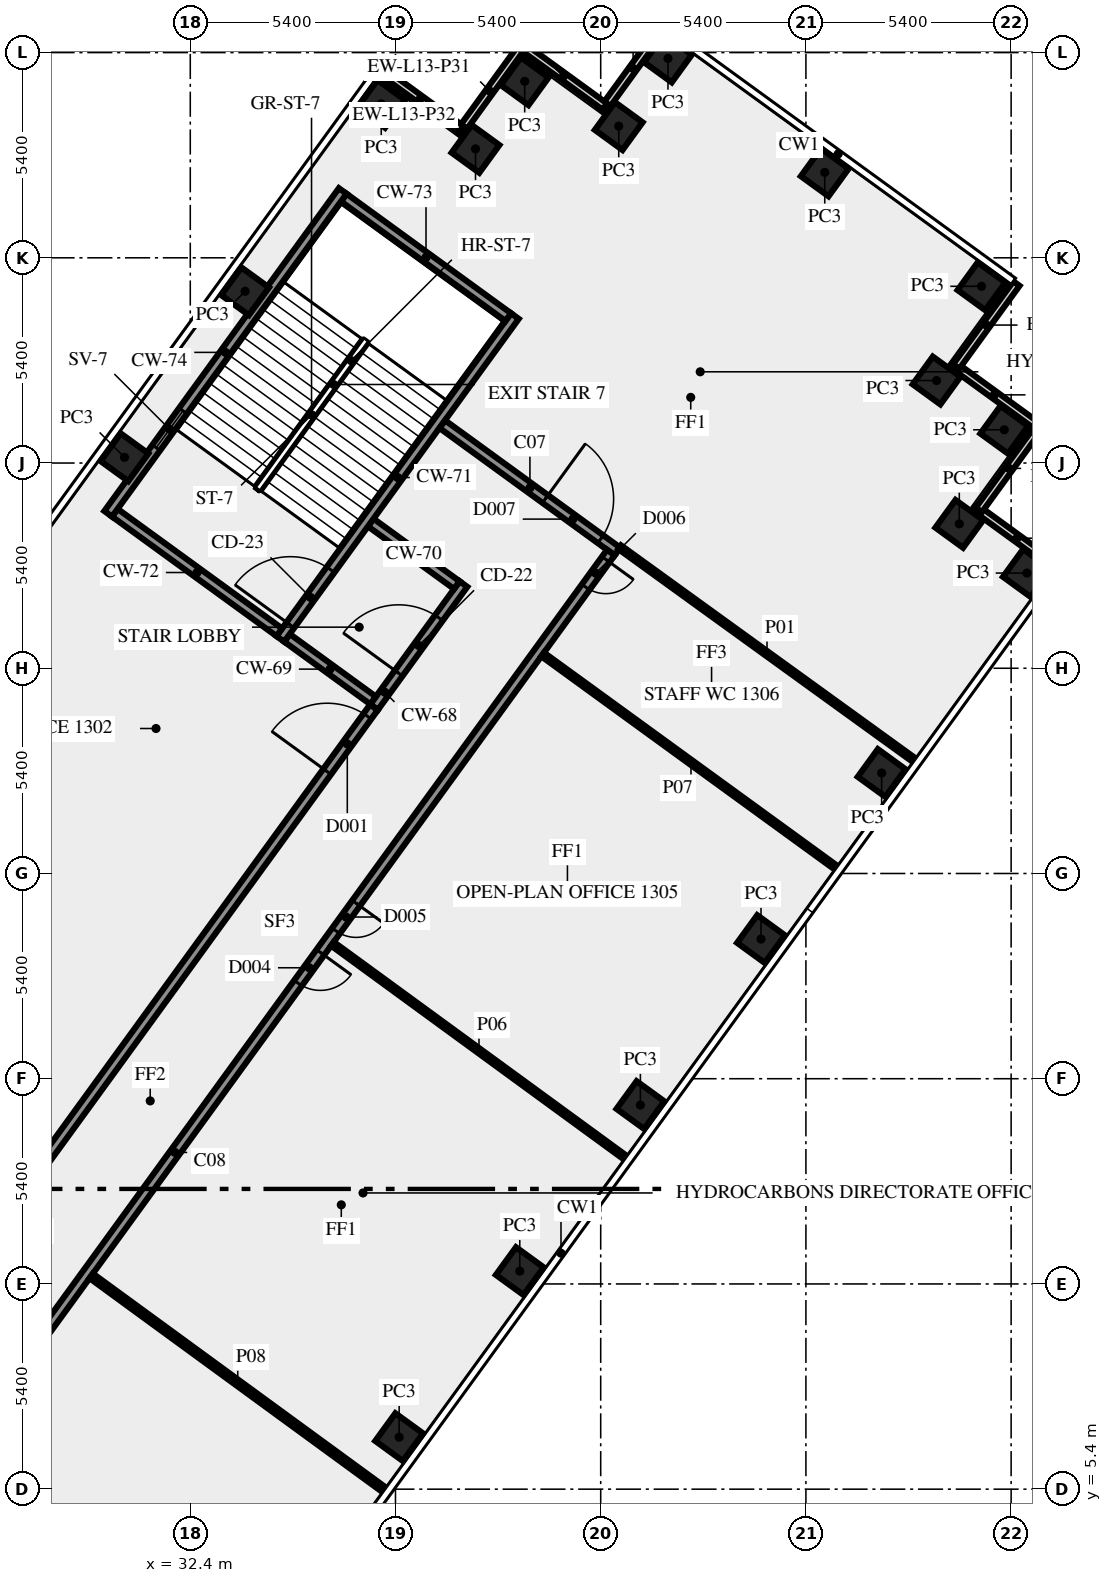
"""IFC4 building model, lengths in metres.
Left out: names, types, materials, properties, quantities, classifications, styles, units other than length and angle.
Written with IfcOpenShell. Run it as: python <this file> out.ifc"""

import sys

from ifc_helpers import new_model, si_unit, direction, frame, frame_2d, origin, origin_2d, place, context, subcontext, project, spatial, rectangle, extrude, element, fill, save


model = new_model("IFC4")
c1 = context("Model", 3, precision=1e-05, world=origin(), true_north=direction((0.0, 1.0)))
c2 = subcontext(c1, "Body", "Model", "MODEL_VIEW")
j1 = project(units=[si_unit("LENGTHUNIT", "METRE"), si_unit("PLANEANGLEUNIT", "RADIAN")], contexts=[c1])
p1 = place(None, origin())
s1 = spatial("IfcSite", under=j1, at=p1, CompositionType="ELEMENT")
p2 = place(p1, origin())
s2 = spatial("IfcBuilding", under=s1, at=p2, CompositionType="ELEMENT")
p3 = place(p2, frame((0.0, 0.0, 59.0)))
s3 = spatial("IfcBuildingStorey", under=s2, at=p3, CompositionType="ELEMENT", Elevation=59.0)
for number, where, z_axis, x_axis in (
    (1, (37.896, 6.769, 0.0), (0.0, 0.0, 1.0), (0.588, 0.809, 0.0)),
    (2, (41.07, 11.137, 0.0), (0.0, 0.0, 1.0), (0.588, 0.809, 0.0)),
    (3, (44.244, 15.506, 0.0), (0.0, 0.0, 1.0), (0.588, 0.809, 0.0)),
    (4, (47.418, 19.875, 0.0), (0.0, 0.0, 1.0), (0.588, 0.809, 0.0)),
    (5, (50.592, 24.243, 0.0), (0.0, 0.0, 1.0), (0.588, 0.809, 0.0)),
    (6, (54.415, 29.505, 0.0), (0.0, 0.0, 1.0), (0.588, 0.809, 0.0)),
    (7, (52.636, 30.8, 0.0), (0.0, 0.0, 1.0), (-0.809, 0.588, 0.0)),
    (8, (53.82, 33.275, 0.0), (0.0, 0.0, 1.0), (-0.809, 0.588, 0.0)),
    (9, (52.039, 34.571, 0.0), (0.0, 0.0, 1.0), (0.588, 0.809, 0.0)),
    (10, (53.22, 37.05, 0.0), (0.0, 0.0, 1.0), (-0.809, 0.588, 0.0)),
    (11, (49.096, 40.047, 0.0), (0.0, 0.0, 1.0), (-0.809, 0.588, 0.0)),
    (12, (44.97, 43.045, 0.0), (0.0, 0.0, 1.0), (-0.809, 0.588, 0.0)),
    (13, (43.675, 41.265, 0.0), (0.0, 0.0, 1.0), (-0.809, 0.588, 0.0)),
    (14, (41.2, 42.445, 0.0), (0.0, 0.0, 1.0), (-0.588, -0.809, 0.0)),
    (15, (39.906, 40.666, 0.0), (0.0, 0.0, 1.0), (-0.588, -0.809, 0.0)),
    (16, (37.425, 41.85, 0.0), (0.0, 0.0, 1.0), (-0.588, -0.809, 0.0)),
    (17, (33.843, 36.919, 0.0), (0.0, 0.0, 1.0), (-0.588, -0.809, 0.0)),
    (18, (30.669, 32.55, 0.0), (0.0, 0.0, 1.0), (-0.588, -0.809, 0.0)),
):
    element("IfcColumn", number, at=place(p3, frame(where, z_axis=z_axis, x_axis=x_axis)), inside=s3, PredefinedType="COLUMN", context=c2, shape_type="SweptSolid", body=[
        extrude(rectangle(XDim=0.9, YDim=0.9, at=origin_2d()), origin(), (0.0, 0.0, 1.0), 3.65),
    ])
p4 = place(p3, frame((55.247, 29.629, 0.0), z_axis=(0.0, 0.0, 1.0), x_axis=(-0.809033161865, 0.587762999008, 0.0)))
e19 = element("IfcWall", 19, at=p4, inside=s3, PredefinedType="SOLIDWALL", context=c2, shape_type="SweptSolid", body=[
    extrude(rectangle(XDim=2.7, YDim=0.2, at=frame_2d((1.35, 0.0))), origin(), (0.0, 0.0, 1.0), 3.65),
])
p5 = place(p3, frame((53.151, 31.167, 0.0), z_axis=(0.0, 0.0, 1.0), x_axis=(0.587779184282, 0.809021403008, 0.0)))
e20 = element("IfcWall", 20, at=p5, inside=s3, PredefinedType="SOLIDWALL", context=c2, shape_type="SweptSolid", body=[
    extrude(rectangle(XDim=2.7, YDim=0.2, at=frame_2d((1.35, 0.0))), origin(), (0.0, 0.0, 1.0), 3.65),
])
for number, where, z_axis, x_axis in (
    (21, (54.65, 33.4, 0.0), (0.0, 0.0, 1.0), (-0.809, 0.588, 0.0)),
    (22, (52.553, 34.938, 0.0), (0.0, 0.0, 1.0), (0.588, 0.809, 0.0)),
    (23, (44.846, 43.875, 0.0), (0.0, 0.0, 1.0), (-0.588, -0.809, 0.0)),
    (24, (43.308, 41.779, 0.0), (0.0, 0.0, 1.0), (-0.809, 0.588, 0.0)),
):
    element("IfcWall", number, at=place(p3, frame(where, z_axis=z_axis, x_axis=x_axis)), inside=s3, PredefinedType="SOLIDWALL", context=c2, shape_type="SweptSolid", body=[
        extrude(rectangle(XDim=2.7, YDim=0.2, at=frame_2d((1.35, 0.0))), origin(), (0.0, 0.0, 1.0), 3.65),
    ])
p6 = place(p3, frame((41.075, 43.278, 0.0), z_axis=(0.0, 0.0, 1.0), x_axis=(-0.587806000234, -0.809001919707, 0.0)))
e25 = element("IfcWall", 25, at=p6, inside=s3, PredefinedType="SOLIDWALL", context=c2, shape_type="SweptSolid", body=[
    extrude(rectangle(XDim=2.7, YDim=0.2, at=frame_2d((1.35, 0.0))), origin(), (0.0, 0.0, 1.0), 3.65),
])
p7 = place(p3, frame((39.537, 41.181, 0.0), z_axis=(0.0, 0.0, 1.0), x_axis=(-0.809033161865, 0.587762999008, 0.0)))
e26 = element("IfcWall", 26, at=p7, inside=s3, PredefinedType="SOLIDWALL", context=c2, shape_type="SweptSolid", body=[
    extrude(rectangle(XDim=2.7, YDim=0.2, at=frame_2d((1.35, 0.0))), origin(), (0.0, 0.0, 1.0), 3.65),
])
p8 = place(p3, frame((37.238, 25.98, 0.0), z_axis=(0.0, 0.0, 1.0), x_axis=(0.587772420479, 0.809026317077, 0.0)))
e27 = element("IfcWall", 27, at=p8, inside=s3, PredefinedType="SHEAR", context=c2, shape_type="SweptSolid", body=[
    extrude(rectangle(XDim=4.0, YDim=0.25, at=frame_2d((2.0, 0.0))), origin(), (0.0, 0.0, 1.0), 3.65),
])
p9 = place(p8, frame((1.1, 0.0, 0.0)))
e28 = element("IfcOpeningElement", 28, at=p9, cuts=e27, PredefinedType="OPENING", context=c2, shape_type="SweptSolid", body=[
    extrude(rectangle(XDim=1.8, YDim=2.1, at=frame_2d((0.9, 1.05))), frame((0.0, 0.135, 0.0), z_axis=(0.0, -1.0, 0.0), x_axis=(1.0, 0.0, 0.0)), (0.0, 0.0, 1.0), 0.27),
])
for number, where, z_axis, x_axis in (
    (29, (37.21, 26.154, 0.0), (0.0, 0.0, 1.0), (-0.809, 0.588, 0.0)),
    (30, (39.414, 29.188, 0.0), (0.0, 0.0, 1.0), (-0.809, 0.588, 0.0)),
):
    element("IfcWall", number, at=place(p3, frame(where, z_axis=z_axis, x_axis=x_axis)), inside=s3, PredefinedType="SHEAR", context=c2, shape_type="SweptSolid", body=[
        extrude(rectangle(XDim=2.8, YDim=0.25, at=frame_2d((1.4, 0.0))), origin(), (0.0, 0.0, 1.0), 3.65),
    ])
p10 = place(p3, frame((34.77, 27.772, 0.0), z_axis=(0.0, 0.0, 1.0), x_axis=(0.587795589702, 0.809009483706, 0.0)))
e31 = element("IfcWall", 31, at=p10, inside=s3, PredefinedType="SHEAR", context=c2, shape_type="SweptSolid", body=[
    extrude(rectangle(XDim=10.5, YDim=0.25, at=frame_2d((5.25, 0.0))), origin(), (0.0, 0.0, 1.0), 3.65),
])
p11 = place(p10, frame((0.45, 0.0, 0.0)))
e32 = element("IfcOpeningElement", 32, at=p11, cuts=e31, PredefinedType="OPENING", context=c2, shape_type="SweptSolid", body=[
    extrude(rectangle(XDim=1.8, YDim=2.1, at=frame_2d((0.9, 1.05))), frame((0.0, 0.135, 0.0), z_axis=(0.0, -1.0, 0.0), x_axis=(1.0, 0.0, 0.0)), (0.0, 0.0, 1.0), 0.27),
])
p12 = place(p3, frame((34.742, 27.947, 0.0), z_axis=(0.0, 0.0, 1.0), x_axis=(-0.8089984606, 0.587810760999, 0.0)))
e33 = element("IfcWall", 33, at=p12, inside=s3, PredefinedType="SHEAR", context=c2, shape_type="SweptSolid", body=[
    extrude(rectangle(XDim=5.35, YDim=0.25, at=frame_2d((2.675, 0.0))), origin(), (0.0, 0.0, 1.0), 3.65),
])
p13 = place(p3, frame((40.767, 36.24, 0.0), z_axis=(0.0, 0.0, 1.0), x_axis=(-0.809020161303, 0.587780893365, 0.0)))
e34 = element("IfcWall", 34, at=p13, inside=s3, PredefinedType="SHEAR", context=c2, shape_type="SweptSolid", body=[
    extrude(rectangle(XDim=5.35, YDim=0.25, at=frame_2d((2.675, 0.0))), origin(), (0.0, 0.0, 1.0), 3.65),
])
p14 = place(p3, frame((30.24, 31.064, 0.0), z_axis=(0.0, 0.0, 1.0), x_axis=(0.587795589702, 0.809009483706, 0.0)))
e35 = element("IfcWall", 35, at=p14, inside=s3, PredefinedType="SHEAR", context=c2, shape_type="SweptSolid", body=[
    extrude(rectangle(XDim=10.5, YDim=0.25, at=frame_2d((5.25, 0.0))), origin(), (0.0, 0.0, 1.0), 3.65),
])
p15 = place(p14, frame((2.15, 0.0, 1.0)))
e36 = element("IfcOpeningElement", 36, at=p15, cuts=e35, PredefinedType="OPENING", context=c2, shape_type="SweptSolid", body=[
    extrude(rectangle(XDim=1.2, YDim=1.2, at=frame_2d((0.6, 0.6))), frame((0.0, 0.135, 0.0), z_axis=(0.0, -1.0, 0.0), x_axis=(1.0, 0.0, 0.0)), (0.0, 0.0, 1.0), 0.27),
])
p16 = place(p3, frame((17.545, -1.125, 0.0), z_axis=(0.0, 0.0, 1.0), x_axis=(0.587786323093, 0.809016216391, 0.0)))
e37 = element("IfcWall", 37, at=p16, inside=s3, PredefinedType="SOLIDWALL", context=c2, shape_type="SweptSolid", body=[
    extrude(rectangle(XDim=33.493, YDim=0.25, at=frame_2d((16.747, 0.0))), origin(), (0.0, 0.0, 1.0), 3.65),
])
p17 = place(p16, frame((31.403, 0.0, 0.0)))
e38 = element("IfcOpeningElement", 38, at=p17, cuts=e37, PredefinedType="OPENING", context=c2, shape_type="SweptSolid", body=[
    extrude(rectangle(XDim=1.8, YDim=2.1, at=frame_2d((0.9, 1.05))), frame((0.0, 0.135, 0.0), z_axis=(0.0, -1.0, 0.0), x_axis=(1.0, 0.0, 0.0)), (0.0, 0.0, 1.0), 0.27),
])
p18 = place(p16, frame((3.392, 0.0, 0.0)))
e39 = element("IfcOpeningElement", 39, at=p18, cuts=e37, PredefinedType="OPENING", context=c2, shape_type="SweptSolid", body=[
    extrude(rectangle(XDim=1.8, YDim=2.1, at=frame_2d((0.9, 1.05))), frame((0.0, 0.135, 0.0), z_axis=(0.0, -1.0, 0.0), x_axis=(1.0, 0.0, 0.0)), (0.0, 0.0, 1.0), 0.27),
])
p19 = place(p3, frame((39.034, 33.42, 0.0), z_axis=(0.0, 0.0, 1.0), x_axis=(0.809023325802, -0.587776537732, 0.0)))
e40 = element("IfcWall", 40, at=p19, inside=s3, PredefinedType="SOLIDWALL", context=c2, shape_type="SweptSolid", body=[
    extrude(rectangle(XDim=5.695, YDim=0.25, at=frame_2d((2.848, 0.0))), origin(), (0.0, 0.0, 1.0), 3.65),
])
p20 = place(p19, frame((3.345, 0.0, 0.0)))
e41 = element("IfcOpeningElement", 41, at=p20, cuts=e40, PredefinedType="OPENING", context=c2, shape_type="SweptSolid", body=[
    extrude(rectangle(XDim=1.8, YDim=2.1, at=frame_2d((0.9, 1.05))), frame((0.0, 0.135, 0.0), z_axis=(0.0, -1.0, 0.0), x_axis=(1.0, 0.0, 0.0)), (0.0, 0.0, 1.0), 0.27),
])
p21 = place(p3, frame((43.467, 30.045, 0.0), z_axis=(0.0, 0.0, 1.0), x_axis=(-0.587784726077, -0.809017376692, 0.0)))
e42 = element("IfcWall", 42, at=p21, inside=s3, PredefinedType="SOLIDWALL", context=c2, shape_type="SweptSolid", body=[
    extrude(rectangle(XDim=39.02, YDim=0.25, at=frame_2d((19.51, 0.0))), origin(), (0.0, 0.0, 1.0), 3.65),
])
p22 = place(p21, frame((11.404, 0.0, 0.0)))
e43 = element("IfcOpeningElement", 43, at=p22, cuts=e42, PredefinedType="OPENING", context=c2, shape_type="SweptSolid", body=[
    extrude(rectangle(XDim=0.9, YDim=2.1, at=frame_2d((0.45, 1.05))), frame((0.0, 0.135, 0.0), z_axis=(0.0, -1.0, 0.0), x_axis=(1.0, 0.0, 0.0)), (0.0, 0.0, 1.0), 0.27),
])
p23 = place(p21, frame((13.004, 0.0, 0.0)))
e44 = element("IfcOpeningElement", 44, at=p23, cuts=e42, PredefinedType="OPENING", context=c2, shape_type="SweptSolid", body=[
    extrude(rectangle(XDim=1.0, YDim=2.1, at=frame_2d((0.5, 1.05))), frame((0.0, 0.135, 0.0), z_axis=(0.0, -1.0, 0.0), x_axis=(1.0, 0.0, 0.0)), (0.0, 0.0, 1.0), 0.27),
])
p24 = place(p21, frame((37.287, 0.0, 0.0)))
e45 = element("IfcOpeningElement", 45, at=p24, cuts=e42, PredefinedType="OPENING", context=c2, shape_type="SweptSolid", body=[
    extrude(rectangle(XDim=1.2, YDim=2.1, at=frame_2d((0.6, 1.05))), frame((0.0, 0.135, 0.0), z_axis=(0.0, -1.0, 0.0), x_axis=(1.0, 0.0, 0.0)), (0.0, 0.0, 1.0), 0.27),
])
p25 = place(p21, frame((0.224, 0.0, 0.0)))
e46 = element("IfcOpeningElement", 46, at=p25, cuts=e42, PredefinedType="OPENING", context=c2, shape_type="SweptSolid", body=[
    extrude(rectangle(XDim=0.9, YDim=2.1, at=frame_2d((0.45, 1.05))), frame((0.0, 0.135, 0.0), z_axis=(0.0, -1.0, 0.0), x_axis=(1.0, 0.0, 0.0)), (0.0, 0.0, 1.0), 0.27),
])
p26 = place(p3, frame((43.698, 30.185, 0.0), z_axis=(0.0, 0.0, 1.0), x_axis=(0.810419489461, -0.58585002441, 0.0)))
e47 = element("IfcWall", 47, at=p26, inside=s3, PredefinedType="PARTITIONING", context=c2, shape_type="SweptSolid", body=[
    extrude(rectangle(XDim=9.57, YDim=0.12, at=frame_2d((4.785, 0.0))), origin(), (0.0, 0.0, 1.0), 2.75),
])
p27 = place(p3, frame((36.141, 19.749, 0.0), z_axis=(0.0, 0.0, 1.0), x_axis=(0.807691251741, -0.589605666408, 0.0)))
e48 = element("IfcWall", 48, at=p27, inside=s3, PredefinedType="PARTITIONING", context=c2, shape_type="SweptSolid", body=[
    extrude(rectangle(XDim=9.55, YDim=0.12, at=frame_2d((4.775, 0.0))), origin(), (0.0, 0.0, 1.0), 2.75),
])
p28 = place(p3, frame((49.48, 21.69, 0.0), z_axis=(0.0, 0.0, 1.0), x_axis=(-0.808999631097, 0.587809150052, 0.0)))
e49 = element("IfcWall", 49, at=p28, inside=s3, PredefinedType="PARTITIONING", context=c2, shape_type="SweptSolid", body=[
    extrude(rectangle(XDim=9.651, YDim=0.12, at=frame_2d((4.826, 0.0))), origin(), (0.0, 0.0, 1.0), 2.75),
])
p29 = place(p3, frame((29.793, 11.012, 0.0), z_axis=(0.0, 0.0, 1.0), x_axis=(0.807645841498, -0.589667868135, 0.0)))
e50 = element("IfcWall", 50, at=p29, inside=s3, PredefinedType="PARTITIONING", context=c2, shape_type="SweptSolid", body=[
    extrude(rectangle(XDim=9.551, YDim=0.15, at=frame_2d((4.775, 0.0))), origin(), (0.0, 0.0, 1.0), 2.75),
])
p30 = place(p9, origin())
e51 = element("IfcDoor", 51, at=p30, inside=s3, OperationType="DOUBLE_DOOR_SINGLE_SWING", PredefinedType="DOOR", context=c2, shape_type="SweptSolid", body=[
    extrude(rectangle(XDim=1.8, YDim=2.1, at=frame_2d((0.9, 1.05))), frame((0.0, 0.025, 0.0), z_axis=(0.0, -1.0, 0.0), x_axis=(1.0, 0.0, 0.0)), (0.0, 0.0, 1.0), 0.05),
])
fill(e28, e51)
p31 = place(p11, origin())
e52 = element("IfcDoor", 52, at=p31, inside=s3, OperationType="DOUBLE_DOOR_SINGLE_SWING", PredefinedType="DOOR", context=c2, shape_type="SweptSolid", body=[
    extrude(rectangle(XDim=1.8, YDim=2.1, at=frame_2d((0.9, 1.05))), frame((0.0, 0.025, 0.0), z_axis=(0.0, -1.0, 0.0), x_axis=(1.0, 0.0, 0.0)), (0.0, 0.0, 1.0), 0.05),
])
fill(e32, e52)
p32 = place(p15, origin())
e53 = element("IfcWindow", 53, at=p32, inside=s3, PartitioningType="SINGLE_PANEL", PredefinedType="WINDOW", context=c2, shape_type="SweptSolid", body=[
    extrude(rectangle(XDim=1.2, YDim=1.2, at=frame_2d((0.6, 0.6))), frame((0.0, 0.03, 0.0), z_axis=(0.0, -1.0, 0.0), x_axis=(1.0, 0.0, 0.0)), (0.0, 0.0, 1.0), 0.06),
])
fill(e36, e53)
p33 = place(p17, origin())
e54 = element("IfcDoor", 54, at=p33, inside=s3, OperationType="DOUBLE_DOOR_SINGLE_SWING", PredefinedType="DOOR", context=c2, shape_type="SweptSolid", body=[
    extrude(rectangle(XDim=1.8, YDim=2.1, at=frame_2d((0.9, 1.05))), frame((0.0, 0.025, 0.0), z_axis=(0.0, -1.0, 0.0), x_axis=(1.0, 0.0, 0.0)), (0.0, 0.0, 1.0), 0.05),
])
fill(e38, e54)
p34 = place(p20, origin())
e55 = element("IfcDoor", 55, at=p34, inside=s3, OperationType="DOUBLE_DOOR_SINGLE_SWING", PredefinedType="DOOR", context=c2, shape_type="SweptSolid", body=[
    extrude(rectangle(XDim=1.8, YDim=2.1, at=frame_2d((0.9, 1.05))), frame((0.0, 0.025, 0.0), z_axis=(0.0, -1.0, 0.0), x_axis=(1.0, 0.0, 0.0)), (0.0, 0.0, 1.0), 0.05),
])
fill(e41, e55)
p35 = place(p22, origin())
e56 = element("IfcDoor", 56, at=p35, inside=s3, OperationType="SINGLE_SWING_RIGHT", PredefinedType="DOOR", context=c2, shape_type="SweptSolid", body=[
    extrude(rectangle(XDim=0.9, YDim=2.1, at=frame_2d((0.45, 1.05))), frame((0.0, 0.025, 0.0), z_axis=(0.0, -1.0, 0.0), x_axis=(1.0, 0.0, 0.0)), (0.0, 0.0, 1.0), 0.05),
])
fill(e43, e56)
p36 = place(p23, origin())
e57 = element("IfcDoor", 57, at=p36, inside=s3, OperationType="SINGLE_SWING_LEFT", PredefinedType="DOOR", context=c2, shape_type="SweptSolid", body=[
    extrude(rectangle(XDim=1.0, YDim=2.1, at=frame_2d((0.5, 1.05))), frame((0.0, 0.025, 0.0), z_axis=(0.0, -1.0, 0.0), x_axis=(1.0, 0.0, 0.0)), (0.0, 0.0, 1.0), 0.05),
])
fill(e44, e57)
p37 = place(p25, origin())
e58 = element("IfcDoor", 58, at=p37, inside=s3, OperationType="SINGLE_SWING_LEFT", PredefinedType="DOOR", context=c2, shape_type="SweptSolid", body=[
    extrude(rectangle(XDim=0.9, YDim=2.1, at=frame_2d((0.45, 1.05))), frame((0.0, 0.025, 0.0), z_axis=(0.0, -1.0, 0.0), x_axis=(1.0, 0.0, 0.0)), (0.0, 0.0, 1.0), 0.05),
])
fill(e46, e58)
save(model, sys.argv[1])
